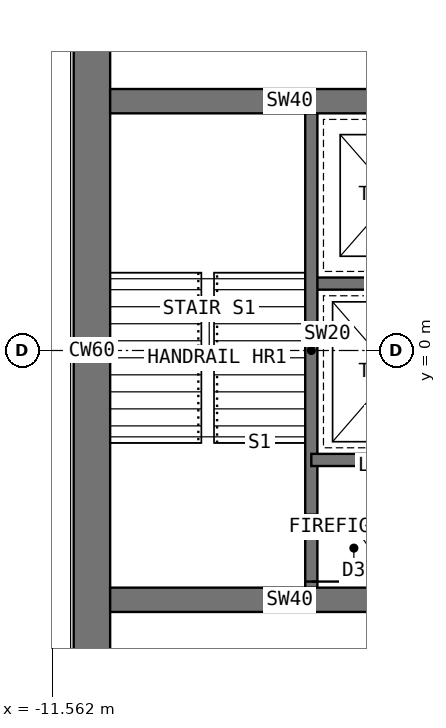
"""IFC4 building model, lengths in metres.
Left out: names, types, materials, properties, quantities, classifications, styles, units other than length and angle.
Written with IfcOpenShell. Run it as: python <this file> out.ifc"""

import sys

from ifc_helpers import new_model, si_unit, direction, frame, frame_2d, origin, place, context, subcontext, project, spatial, rectangle, extrude, element, fill, save


model = new_model("IFC4")
c1 = context("Model", 3, precision=1e-05, world=origin(), true_north=direction((0.0, 1.0)))
c2 = subcontext(c1, "Body", "Model", "MODEL_VIEW")
j1 = project(units=[si_unit("LENGTHUNIT", "METRE"), si_unit("PLANEANGLEUNIT", "RADIAN")], contexts=[c1])
p1 = place(None, origin())
s1 = spatial("IfcSite", under=j1, at=p1, CompositionType="ELEMENT")
p2 = place(p1, origin())
s2 = spatial("IfcBuilding", under=s1, at=p2, CompositionType="ELEMENT")
p3 = place(p2, frame((0.0, 0.0, 145.5)))
s3 = spatial("IfcBuildingStorey", under=s2, at=p3, CompositionType="ELEMENT", Elevation=145.5)
p4 = place(p3, frame((-10.908, 6.298, 0.0), z_axis=(0.0, 0.0, 1.0), x_axis=(0.0, -1.0, 0.0)))
e1 = element("IfcWall", 1, at=p4, inside=s3, PredefinedType="SHEAR", context=c2, shape_type="SweptSolid", body=[
    extrude(rectangle(XDim=12.596, YDim=0.6, at=frame_2d((6.298, 0.0))), origin(), (0.0, 0.0, 1.0), 4.0),
])
p5 = place(p3, frame((-4.7, 1.1, 0.0), z_axis=(0.0, 0.0, 1.0), x_axis=(-1.0, 0.0, 0.0)))
e2 = element("IfcWall", 2, at=p5, inside=s3, PredefinedType="SHEAR", context=c2, shape_type="SweptSolid", body=[
    extrude(rectangle(XDim=2.6, YDim=0.2, at=frame_2d((1.3, 0.0))), origin(), (0.0, 0.0, 1.0), 4.0),
])
p6 = place(p3, frame((-4.7, -1.8, 0.0), z_axis=(0.0, 0.0, 1.0), x_axis=(-1.0, 0.0, 0.0)))
e3 = element("IfcWall", 3, at=p6, inside=s3, PredefinedType="SHEAR", context=c2, shape_type="SweptSolid", body=[
    extrude(rectangle(XDim=2.6, YDim=0.2, at=frame_2d((1.3, 0.0))), origin(), (0.0, 0.0, 1.0), 4.0),
])
p7 = place(p6, frame((0.55, 0.0, 0.0)))
e4 = element("IfcOpeningElement", 4, at=p7, cuts=e3, PredefinedType="OPENING", context=c2, shape_type="SweptSolid", body=[
    extrude(rectangle(XDim=1.3, YDim=2.2, at=frame_2d((0.65, 1.1))), frame((0.0, 0.11, 0.0), z_axis=(0.0, -1.0, 0.0), x_axis=(1.0, 0.0, 0.0)), (0.0, 0.0, 1.0), 0.22),
])
p8 = place(p3, frame((-7.3, 4.0, 0.0), z_axis=(0.0, 0.0, 1.0), x_axis=(0.0, -1.0, 0.0)))
e5 = element("IfcWall", 5, at=p8, inside=s3, PredefinedType="SHEAR", context=c2, shape_type="SweptSolid", body=[
    extrude(rectangle(XDim=8.0, YDim=0.2, at=frame_2d((4.0, 0.0))), origin(), (0.0, 0.0, 1.0), 4.0),
])
p9 = place(p8, frame((6.7, 0.0, 0.0)))
e6 = element("IfcOpeningElement", 6, at=p9, cuts=e5, PredefinedType="OPENING", context=c2, shape_type="SweptSolid", body=[
    extrude(rectangle(XDim=1.1, YDim=2.1, at=frame_2d((0.55, 1.05))), frame((0.0, 0.11, 0.0), z_axis=(0.0, -1.0, 0.0), x_axis=(1.0, 0.0, 0.0)), (0.0, 0.0, 1.0), 0.22),
])
for number, where, z_axis, x_axis in (
    (7, (-4.7, -4.1, 0.0), (0.0, 0.0, 1.0), (-1.0, 0.0, 0.0)),
    (8, (-4.7, 4.1, 0.0), (0.0, 0.0, 1.0), (-1.0, 0.0, 0.0)),
):
    element("IfcWall", number, at=place(p3, frame(where, z_axis=z_axis, x_axis=x_axis)), inside=s3, PredefinedType="SHEAR", context=c2, shape_type="SweptSolid", body=[
        extrude(rectangle(XDim=5.908, YDim=0.4, at=frame_2d((2.954, 0.0))), origin(), (0.0, 0.0, 1.0), 4.0),
    ])
p10 = place(p3, frame((-6.695, -8.396, 0.0), z_axis=(0.0, 0.0, 1.0), x_axis=(0.500009315796, 0.86602002524, 0.0)))
e9 = element("IfcWall", 9, at=p10, inside=s3, PredefinedType="PARTITIONING", context=c2, shape_type="SweptSolid", body=[
    extrude(rectangle(XDim=4.519, YDim=0.15, at=frame_2d((2.259, 0.0))), origin(), (0.0, 0.0, 1.0), 3.8),
])
p11 = place(p10, frame((1.749, 0.0, 0.0)))
e10 = element("IfcOpeningElement", 10, at=p11, cuts=e9, PredefinedType="OPENING", context=c2, shape_type="SweptSolid", body=[
    extrude(rectangle(XDim=1.0, YDim=2.1, at=frame_2d((0.5, 1.05))), frame((0.0, 0.085, 0.0), z_axis=(0.0, -1.0, 0.0), x_axis=(1.0, 0.0, 0.0)), (0.0, 0.0, 1.0), 0.17),
])
p12 = place(p3, frame((-4.436, 4.483, 0.0), z_axis=(0.0, 0.0, 1.0), x_axis=(-0.500009315796, 0.86602002524, 0.0)))
e11 = element("IfcWall", 11, at=p12, inside=s3, PredefinedType="PARTITIONING", context=c2, shape_type="SweptSolid", body=[
    extrude(rectangle(XDim=4.519, YDim=0.15, at=frame_2d((2.259, 0.0))), origin(), (0.0, 0.0, 1.0), 3.8),
])
p13 = place(p12, frame((1.769, 0.0, 0.0)))
e12 = element("IfcOpeningElement", 12, at=p13, cuts=e11, PredefinedType="OPENING", context=c2, shape_type="SweptSolid", body=[
    extrude(rectangle(XDim=1.0, YDim=2.1, at=frame_2d((0.5, 1.05))), frame((0.0, 0.085, 0.0), z_axis=(0.0, -1.0, 0.0), x_axis=(1.0, 0.0, 0.0)), (0.0, 0.0, 1.0), 0.17),
])
p14 = place(p7, origin())
e13 = element("IfcDoor", 13, at=p14, inside=s3, OperationType="DOUBLE_DOOR_SLIDING", PredefinedType="DOOR", context=c2, shape_type="SweptSolid", body=[
    extrude(rectangle(XDim=1.3, YDim=2.2, at=frame_2d((0.65, 1.1))), frame((0.0, 0.025, 0.0), z_axis=(0.0, -1.0, 0.0), x_axis=(1.0, 0.0, 0.0)), (0.0, 0.0, 1.0), 0.05),
])
fill(e4, e13)
p15 = place(p9, origin())
e14 = element("IfcDoor", 14, at=p15, inside=s3, OperationType="SINGLE_SWING_RIGHT", PredefinedType="DOOR", context=c2, shape_type="SweptSolid", body=[
    extrude(rectangle(XDim=1.1, YDim=2.1, at=frame_2d((0.55, 1.05))), frame((0.0, 0.025, 0.0), z_axis=(0.0, -1.0, 0.0), x_axis=(1.0, 0.0, 0.0)), (0.0, 0.0, 1.0), 0.05),
])
fill(e6, e14)
save(model, sys.argv[1])
